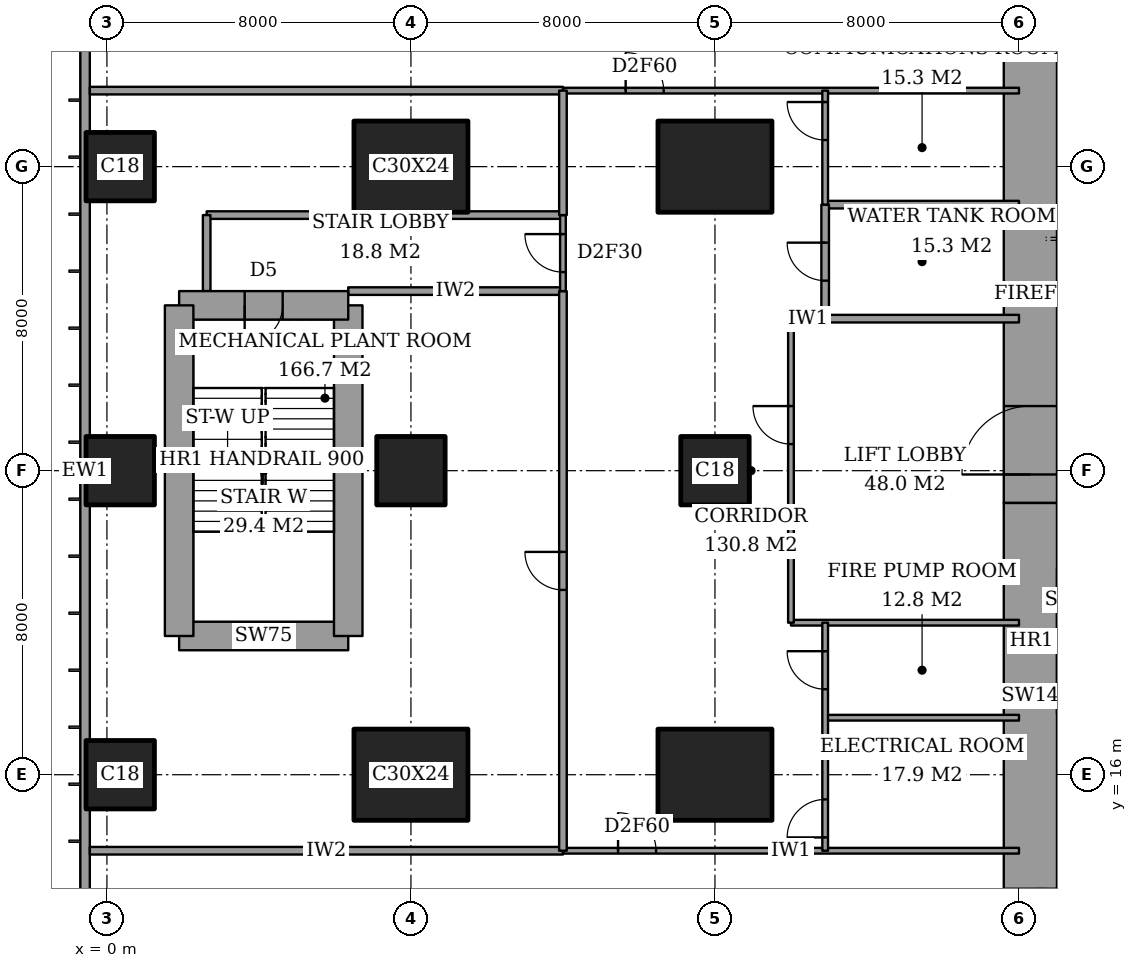
"""IFC4 building model, lengths in metres.
Left out: names, types, materials, properties, quantities, classifications, styles, units other than length and angle.
Written with IfcOpenShell. Run it as: python <this file> out.ifc"""

import sys

from ifc_helpers import new_model, si_unit, direction, frame, frame_2d, origin, origin_2d, place, context, subcontext, project, spatial, rectangle, extrude, element, fill, save


model = new_model("IFC4")
c1 = context("Model", 3, precision=1e-05, world=origin(), true_north=direction((0.0, 1.0)))
c2 = subcontext(c1, "Body", "Model", "MODEL_VIEW")
j1 = project(units=[si_unit("LENGTHUNIT", "METRE"), si_unit("PLANEANGLEUNIT", "RADIAN")], contexts=[c1])
p1 = place(None, origin())
s1 = spatial("IfcSite", under=j1, at=p1, CompositionType="ELEMENT")
p2 = place(p1, origin())
s2 = spatial("IfcBuilding", under=s1, at=p2, CompositionType="ELEMENT")
p3 = place(p2, frame((0.0, 0.0, 171.8)))
s3 = spatial("IfcBuildingStorey", under=s2, at=p3, CompositionType="ELEMENT", Elevation=171.8)
for number, where, z_axis, x_axis in (
    (1, (0.35, 16.0, 0.0), (0.0, 0.0, 1.0), (1.0, 0.0, 0.0)),
    (2, (0.35, 24.0, 0.0), (0.0, 0.0, 1.0), (1.0, 0.0, 0.0)),
    (3, (0.35, 32.0, 0.0), (0.0, 0.0, 1.0), (1.0, 0.0, 0.0)),
):
    element("IfcColumn", number, at=place(p3, frame(where, z_axis=z_axis, x_axis=x_axis)), inside=s3, PredefinedType="COLUMN", context=c2, shape_type="SweptSolid", body=[
        extrude(rectangle(XDim=1.8, YDim=1.8, at=origin_2d()), origin(), (0.0, 0.0, 1.0), 5.4),
    ])
p4 = place(p3, frame((8.0, 16.0, 0.0), z_axis=(0.0, 0.0, 1.0), x_axis=(1.0, 0.0, 0.0)))
e4 = element("IfcColumn", 4, at=p4, inside=s3, PredefinedType="COLUMN", context=c2, shape_type="SweptSolid", body=[
    extrude(rectangle(XDim=3.0, YDim=2.4, at=origin_2d()), origin(), (0.0, 0.0, 1.0), 5.4),
])
p5 = place(p3, frame((8.0, 24.0, 0.0), z_axis=(0.0, 0.0, 1.0), x_axis=(1.0, 0.0, 0.0)))
e5 = element("IfcColumn", 5, at=p5, inside=s3, PredefinedType="COLUMN", context=c2, shape_type="SweptSolid", body=[
    extrude(rectangle(XDim=1.8, YDim=1.8, at=origin_2d()), origin(), (0.0, 0.0, 1.0), 5.4),
])
for number, where, z_axis, x_axis in (
    (6, (8.0, 32.0, 0.0), (0.0, 0.0, 1.0), (1.0, 0.0, 0.0)),
    (7, (16.0, 16.0, 0.0), (0.0, 0.0, 1.0), (1.0, 0.0, 0.0)),
):
    element("IfcColumn", number, at=place(p3, frame(where, z_axis=z_axis, x_axis=x_axis)), inside=s3, PredefinedType="COLUMN", context=c2, shape_type="SweptSolid", body=[
        extrude(rectangle(XDim=3.0, YDim=2.4, at=origin_2d()), origin(), (0.0, 0.0, 1.0), 5.4),
    ])
p6 = place(p3, frame((16.0, 24.0, 0.0), z_axis=(0.0, 0.0, 1.0), x_axis=(1.0, 0.0, 0.0)))
e8 = element("IfcColumn", 8, at=p6, inside=s3, PredefinedType="COLUMN", context=c2, shape_type="SweptSolid", body=[
    extrude(rectangle(XDim=1.8, YDim=1.8, at=origin_2d()), origin(), (0.0, 0.0, 1.0), 5.4),
])
p7 = place(p3, frame((16.0, 32.0, 0.0), z_axis=(0.0, 0.0, 1.0), x_axis=(1.0, 0.0, 0.0)))
e9 = element("IfcColumn", 9, at=p7, inside=s3, PredefinedType="COLUMN", context=c2, shape_type="SweptSolid", body=[
    extrude(rectangle(XDim=3.0, YDim=2.4, at=origin_2d()), origin(), (0.0, 0.0, 1.0), 5.4),
])
p8 = place(p3, frame((24.3, 13.0, 0.0), z_axis=(0.0, 0.0, 1.0), x_axis=(0.0, 1.0, 0.0)))
e10 = element("IfcWall", 10, at=p8, inside=s3, PredefinedType="SHEAR", context=c2, shape_type="SweptSolid", body=[
    extrude(rectangle(XDim=10.15, YDim=1.4, at=frame_2d((5.075, 0.0))), origin(), (0.0, 0.0, 1.0), 5.4),
])
p9 = place(p3, frame((24.3, 23.15, 0.0), z_axis=(0.0, 0.0, 1.0), x_axis=(0.0, 1.0, 0.0)))
e11 = element("IfcWall", 11, at=p9, inside=s3, PredefinedType="SHEAR", context=c2, shape_type="SweptSolid", body=[
    extrude(rectangle(XDim=11.85, YDim=1.4, at=frame_2d((5.925, 0.0))), origin(), (0.0, 0.0, 1.0), 5.4),
])
p10 = place(p9, frame((0.75, 0.0, 0.0)))
e12 = element("IfcOpeningElement", 12, at=p10, cuts=e11, PredefinedType="OPENING", context=c2, shape_type="SweptSolid", body=[
    extrude(rectangle(XDim=1.8, YDim=2.4, at=frame_2d((0.9, 1.2))), frame((0.0, 0.71, 0.0), z_axis=(0.0, -1.0, 0.0), x_axis=(1.0, 0.0, 0.0)), (0.0, 0.0, 1.0), 1.42),
])
p11 = place(p3, frame((1.9, 19.65, 0.0), z_axis=(0.0, 0.0, 1.0), x_axis=(1.0, 0.0, 0.0)))
e13 = element("IfcWall", 13, at=p11, inside=s3, PredefinedType="SHEAR", context=c2, shape_type="SweptSolid", body=[
    extrude(rectangle(XDim=4.45, YDim=0.75, at=frame_2d((2.225, 0.0))), origin(), (0.0, 0.0, 1.0), 5.4),
])
p12 = place(p3, frame((6.35, 19.65, 0.0), z_axis=(0.0, 0.0, 1.0), x_axis=(0.0, 1.0, 0.0)))
e14 = element("IfcWall", 14, at=p12, inside=s3, PredefinedType="SHEAR", context=c2, shape_type="SweptSolid", body=[
    extrude(rectangle(XDim=8.7, YDim=0.75, at=frame_2d((4.35, 0.0))), origin(), (0.0, 0.0, 1.0), 5.4),
])
p13 = place(p3, frame((6.35, 28.35, 0.0), z_axis=(0.0, 0.0, 1.0), x_axis=(-1.0, 0.0, 0.0)))
e15 = element("IfcWall", 15, at=p13, inside=s3, PredefinedType="SHEAR", context=c2, shape_type="SweptSolid", body=[
    extrude(rectangle(XDim=4.45, YDim=0.75, at=frame_2d((2.225, 0.0))), origin(), (0.0, 0.0, 1.0), 5.4),
])
p14 = place(p13, frame((1.725, 0.0, 0.0)))
e16 = element("IfcOpeningElement", 16, at=p14, cuts=e15, PredefinedType="OPENING", context=c2, shape_type="SweptSolid", body=[
    extrude(rectangle(XDim=1.0, YDim=2.1, at=frame_2d((0.5, 1.05))), frame((0.0, 0.385, 0.0), z_axis=(0.0, -1.0, 0.0), x_axis=(1.0, 0.0, 0.0)), (0.0, 0.0, 1.0), 0.77),
])
p15 = place(p3, frame((1.9, 28.35, 0.0), z_axis=(0.0, 0.0, 1.0), x_axis=(0.0, -1.0, 0.0)))
e17 = element("IfcWall", 17, at=p15, inside=s3, PredefinedType="SHEAR", context=c2, shape_type="SweptSolid", body=[
    extrude(rectangle(XDim=8.7, YDim=0.75, at=frame_2d((4.35, 0.0))), origin(), (0.0, 0.0, 1.0), 5.4),
])
p16 = place(p3, frame((-0.575, 44.825, 0.0), z_axis=(0.0, 0.0, 1.0), x_axis=(0.0, -1.0, 0.0)))
e18 = element("IfcWall", 18, at=p16, inside=s3, PredefinedType="SOLIDWALL", context=c2, shape_type="SweptSolid", body=[
    extrude(rectangle(XDim=41.65, YDim=0.25, at=frame_2d((20.825, 0.0))), origin(), (0.0, 0.0, 1.0), 5.4),
])
p17 = place(p16, frame((0.825, 0.0, 0.9)))
e19 = element("IfcOpeningElement", 19, at=p17, cuts=e18, PredefinedType="OPENING", context=c2, shape_type="SweptSolid", body=[
    extrude(rectangle(XDim=2.4, YDim=2.4, at=frame_2d((1.2, 1.2))), frame((0.0, 0.135, 0.0), z_axis=(0.0, -1.0, 0.0), x_axis=(1.0, 0.0, 0.0)), (0.0, 0.0, 1.0), 0.27),
])
p18 = place(p16, frame((38.425, 0.0, 0.9)))
e20 = element("IfcOpeningElement", 20, at=p18, cuts=e18, PredefinedType="OPENING", context=c2, shape_type="SweptSolid", body=[
    extrude(rectangle(XDim=2.4, YDim=2.4, at=frame_2d((1.2, 1.2))), frame((0.0, 0.135, 0.0), z_axis=(0.0, -1.0, 0.0), x_axis=(1.0, 0.0, 0.0)), (0.0, 0.0, 1.0), 0.27),
])
p19 = place(p3, frame((-0.45, 14.0, 0.0), z_axis=(0.0, 0.0, 1.0), x_axis=(1.0, 0.0, 0.0)))
e21 = element("IfcWall", 21, at=p19, inside=s3, PredefinedType="PARTITIONING", context=c2, shape_type="SweptSolid", body=[
    extrude(rectangle(XDim=12.45, YDim=0.2, at=frame_2d((6.225, 0.0))), origin(), (0.0, 0.0, 1.0), 5.15),
])
p20 = place(p3, frame((12.0, 14.0, 0.0), z_axis=(0.0, 0.0, 1.0), x_axis=(1.0, 0.0, 0.0)))
e22 = element("IfcWall", 22, at=p20, inside=s3, PredefinedType="PARTITIONING", context=c2, shape_type="SweptSolid", body=[
    extrude(rectangle(XDim=12.0, YDim=0.15, at=frame_2d((6.0, 0.0))), origin(), (0.0, 0.0, 1.0), 5.15),
])
p21 = place(p20, frame((1.45, 0.0, 0.0)))
e23 = element("IfcOpeningElement", 23, at=p21, cuts=e22, PredefinedType="OPENING", context=c2, shape_type="SweptSolid", body=[
    extrude(rectangle(XDim=1.0, YDim=2.1, at=frame_2d((0.5, 1.05))), frame((0.0, 0.085, 0.0), z_axis=(0.0, -1.0, 0.0), x_axis=(1.0, 0.0, 0.0)), (0.0, 0.0, 1.0), 0.17),
])
p22 = place(p3, frame((18.9, 17.5, 0.0), z_axis=(0.0, 0.0, 1.0), x_axis=(1.0, 0.0, 0.0)))
e24 = element("IfcWall", 24, at=p22, inside=s3, PredefinedType="PARTITIONING", context=c2, shape_type="SweptSolid", body=[
    extrude(rectangle(XDim=5.1, YDim=0.15, at=frame_2d((2.55, 0.0))), origin(), (0.0, 0.0, 1.0), 5.15),
])
p23 = place(p3, frame((18.0, 20.0, 0.0), z_axis=(0.0, 0.0, 1.0), x_axis=(1.0, 0.0, 0.0)))
e25 = element("IfcWall", 25, at=p23, inside=s3, PredefinedType="PARTITIONING", context=c2, shape_type="SweptSolid", body=[
    extrude(rectangle(XDim=6.0, YDim=0.15, at=frame_2d((3.0, 0.0))), origin(), (0.0, 0.0, 1.0), 5.15),
])
p24 = place(p3, frame((18.9, 28.0, 0.0), z_axis=(0.0, 0.0, 1.0), x_axis=(1.0, 0.0, 0.0)))
e26 = element("IfcWall", 26, at=p24, inside=s3, PredefinedType="PARTITIONING", context=c2, shape_type="SweptSolid", body=[
    extrude(rectangle(XDim=5.1, YDim=0.2, at=frame_2d((2.55, 0.0))), origin(), (0.0, 0.0, 1.0), 5.15),
])
p25 = place(p3, frame((18.0, 28.0, 0.0), z_axis=(0.0, 0.0, 1.0), x_axis=(1.0, 0.0, 0.0)))
e27 = element("IfcWall", 27, at=p25, inside=s3, PredefinedType="PARTITIONING", context=c2, shape_type="SweptSolid", body=[
    extrude(rectangle(XDim=0.9, YDim=0.15, at=frame_2d((0.45, 0.0))), origin(), (0.0, 0.0, 1.0), 5.15),
])
p26 = place(p3, frame((6.35, 28.725, 0.0), z_axis=(0.0, 0.0, 1.0), x_axis=(1.0, 0.0, 0.0)))
e28 = element("IfcWall", 28, at=p26, inside=s3, PredefinedType="PARTITIONING", context=c2, shape_type="SweptSolid", body=[
    extrude(rectangle(XDim=5.65, YDim=0.2, at=frame_2d((2.825, 0.0))), origin(), (0.0, 0.0, 1.0), 5.15),
])
p27 = place(p3, frame((2.625, 30.725, 0.0), z_axis=(0.0, 0.0, 1.0), x_axis=(1.0, 0.0, 0.0)))
e29 = element("IfcWall", 29, at=p27, inside=s3, PredefinedType="PARTITIONING", context=c2, shape_type="SweptSolid", body=[
    extrude(rectangle(XDim=9.375, YDim=0.2, at=frame_2d((4.688, 0.0))), origin(), (0.0, 0.0, 1.0), 5.15),
])
p28 = place(p3, frame((18.9, 31.0, 0.0), z_axis=(0.0, 0.0, 1.0), x_axis=(1.0, 0.0, 0.0)))
e30 = element("IfcWall", 30, at=p28, inside=s3, PredefinedType="PARTITIONING", context=c2, shape_type="SweptSolid", body=[
    extrude(rectangle(XDim=5.1, YDim=0.2, at=frame_2d((2.55, 0.0))), origin(), (0.0, 0.0, 1.0), 5.15),
])
p29 = place(p3, frame((-0.45, 34.0, 0.0), z_axis=(0.0, 0.0, 1.0), x_axis=(1.0, 0.0, 0.0)))
e31 = element("IfcWall", 31, at=p29, inside=s3, PredefinedType="PARTITIONING", context=c2, shape_type="SweptSolid", body=[
    extrude(rectangle(XDim=12.45, YDim=0.2, at=frame_2d((6.225, 0.0))), origin(), (0.0, 0.0, 1.0), 5.15),
])
p30 = place(p3, frame((12.0, 34.0, 0.0), z_axis=(0.0, 0.0, 1.0), x_axis=(1.0, 0.0, 0.0)))
e32 = element("IfcWall", 32, at=p30, inside=s3, PredefinedType="PARTITIONING", context=c2, shape_type="SweptSolid", body=[
    extrude(rectangle(XDim=12.0, YDim=0.15, at=frame_2d((6.0, 0.0))), origin(), (0.0, 0.0, 1.0), 5.15),
])
p31 = place(p30, frame((1.65, 0.0, 0.0)))
e33 = element("IfcOpeningElement", 33, at=p31, cuts=e32, PredefinedType="OPENING", context=c2, shape_type="SweptSolid", body=[
    extrude(rectangle(XDim=1.0, YDim=2.1, at=frame_2d((0.5, 1.05))), frame((0.0, 0.085, 0.0), z_axis=(0.0, -1.0, 0.0), x_axis=(1.0, 0.0, 0.0)), (0.0, 0.0, 1.0), 0.17),
])
p32 = place(p3, frame((2.625, 28.725, 0.0), z_axis=(0.0, 0.0, 1.0), x_axis=(0.0, 1.0, 0.0)))
e34 = element("IfcWall", 34, at=p32, inside=s3, PredefinedType="PARTITIONING", context=c2, shape_type="SweptSolid", body=[
    extrude(rectangle(XDim=2.0, YDim=0.2, at=frame_2d((1.0, 0.0))), origin(), (0.0, 0.0, 1.0), 5.15),
])
p33 = place(p3, frame((12.0, 14.0, 0.0), z_axis=(0.0, 0.0, 1.0), x_axis=(0.0, 1.0, 0.0)))
e35 = element("IfcWall", 35, at=p33, inside=s3, PredefinedType="PARTITIONING", context=c2, shape_type="SweptSolid", body=[
    extrude(rectangle(XDim=14.725, YDim=0.2, at=frame_2d((7.363, 0.0))), origin(), (0.0, 0.0, 1.0), 5.15),
])
p34 = place(p33, frame((6.863, 0.0, 0.0)))
e36 = element("IfcOpeningElement", 36, at=p34, cuts=e35, PredefinedType="OPENING", context=c2, shape_type="SweptSolid", body=[
    extrude(rectangle(XDim=1.0, YDim=2.1, at=frame_2d((0.5, 1.05))), frame((0.0, 0.11, 0.0), z_axis=(0.0, -1.0, 0.0), x_axis=(1.0, 0.0, 0.0)), (0.0, 0.0, 1.0), 0.22),
])
p35 = place(p3, frame((12.0, 30.725, 0.0), z_axis=(0.0, 0.0, 1.0), x_axis=(0.0, 1.0, 0.0)))
e37 = element("IfcWall", 37, at=p35, inside=s3, PredefinedType="PARTITIONING", context=c2, shape_type="SweptSolid", body=[
    extrude(rectangle(XDim=3.275, YDim=0.2, at=frame_2d((1.637, 0.0))), origin(), (0.0, 0.0, 1.0), 5.15),
])
p36 = place(p3, frame((12.0, 28.725, 0.0), z_axis=(0.0, 0.0, 1.0), x_axis=(0.0, 1.0, 0.0)))
e38 = element("IfcWall", 38, at=p36, inside=s3, PredefinedType="PARTITIONING", context=c2, shape_type="SweptSolid", body=[
    extrude(rectangle(XDim=2.0, YDim=0.15, at=frame_2d((1.0, 0.0))), origin(), (0.0, 0.0, 1.0), 5.15),
])
p37 = place(p36, frame((0.5, 0.0, 0.0)))
e39 = element("IfcOpeningElement", 39, at=p37, cuts=e38, PredefinedType="OPENING", context=c2, shape_type="SweptSolid", body=[
    extrude(rectangle(XDim=1.0, YDim=2.1, at=frame_2d((0.5, 1.05))), frame((0.0, 0.085, 0.0), z_axis=(0.0, -1.0, 0.0), x_axis=(1.0, 0.0, 0.0)), (0.0, 0.0, 1.0), 0.17),
])
p38 = place(p3, frame((18.0, 20.0, 0.0), z_axis=(0.0, 0.0, 1.0), x_axis=(0.0, 1.0, 0.0)))
e40 = element("IfcWall", 40, at=p38, inside=s3, PredefinedType="PARTITIONING", context=c2, shape_type="SweptSolid", body=[
    extrude(rectangle(XDim=8.0, YDim=0.15, at=frame_2d((4.0, 0.0))), origin(), (0.0, 0.0, 1.0), 5.15),
])
p39 = place(p38, frame((4.7, 0.0, 0.0)))
e41 = element("IfcOpeningElement", 41, at=p39, cuts=e40, PredefinedType="OPENING", context=c2, shape_type="SweptSolid", body=[
    extrude(rectangle(XDim=1.0, YDim=2.1, at=frame_2d((0.5, 1.05))), frame((0.0, 0.085, 0.0), z_axis=(0.0, -1.0, 0.0), x_axis=(1.0, 0.0, 0.0)), (0.0, 0.0, 1.0), 0.17),
])
p40 = place(p3, frame((18.9, 28.0, 0.0), z_axis=(0.0, 0.0, 1.0), x_axis=(0.0, 1.0, 0.0)))
e42 = element("IfcWall", 42, at=p40, inside=s3, PredefinedType="PARTITIONING", context=c2, shape_type="SweptSolid", body=[
    extrude(rectangle(XDim=3.0, YDim=0.2, at=frame_2d((1.5, 0.0))), origin(), (0.0, 0.0, 1.0), 5.15),
])
p41 = place(p40, frame((1.0, 0.0, 0.0)))
e43 = element("IfcOpeningElement", 43, at=p41, cuts=e42, PredefinedType="OPENING", context=c2, shape_type="SweptSolid", body=[
    extrude(rectangle(XDim=1.0, YDim=2.1, at=frame_2d((0.5, 1.05))), frame((0.0, 0.11, 0.0), z_axis=(0.0, -1.0, 0.0), x_axis=(1.0, 0.0, 0.0)), (0.0, 0.0, 1.0), 0.22),
])
p42 = place(p3, frame((18.9, 14.0, 0.0), z_axis=(0.0, 0.0, 1.0), x_axis=(0.0, 1.0, 0.0)))
e44 = element("IfcWall", 44, at=p42, inside=s3, PredefinedType="PARTITIONING", context=c2, shape_type="SweptSolid", body=[
    extrude(rectangle(XDim=6.0, YDim=0.15, at=frame_2d((3.0, 0.0))), origin(), (0.0, 0.0, 1.0), 5.15),
])
p43 = place(p42, frame((0.35, 0.0, 0.0)))
e45 = element("IfcOpeningElement", 45, at=p43, cuts=e44, PredefinedType="OPENING", context=c2, shape_type="SweptSolid", body=[
    extrude(rectangle(XDim=1.0, YDim=2.1, at=frame_2d((0.5, 1.05))), frame((0.0, 0.085, 0.0), z_axis=(0.0, -1.0, 0.0), x_axis=(1.0, 0.0, 0.0)), (0.0, 0.0, 1.0), 0.17),
])
p44 = place(p42, frame((4.25, 0.0, 0.0)))
e46 = element("IfcOpeningElement", 46, at=p44, cuts=e44, PredefinedType="OPENING", context=c2, shape_type="SweptSolid", body=[
    extrude(rectangle(XDim=1.0, YDim=2.1, at=frame_2d((0.5, 1.05))), frame((0.0, 0.085, 0.0), z_axis=(0.0, -1.0, 0.0), x_axis=(1.0, 0.0, 0.0)), (0.0, 0.0, 1.0), 0.17),
])
p45 = place(p3, frame((18.9, 31.0, 0.0), z_axis=(0.0, 0.0, 1.0), x_axis=(0.0, 1.0, 0.0)))
e47 = element("IfcWall", 47, at=p45, inside=s3, PredefinedType="PARTITIONING", context=c2, shape_type="SweptSolid", body=[
    extrude(rectangle(XDim=3.0, YDim=0.15, at=frame_2d((1.5, 0.0))), origin(), (0.0, 0.0, 1.0), 5.15),
])
p46 = place(p45, frame((1.7, 0.0, 0.0)))
e48 = element("IfcOpeningElement", 48, at=p46, cuts=e47, PredefinedType="OPENING", context=c2, shape_type="SweptSolid", body=[
    extrude(rectangle(XDim=1.0, YDim=2.1, at=frame_2d((0.5, 1.05))), frame((0.0, 0.085, 0.0), z_axis=(0.0, -1.0, 0.0), x_axis=(1.0, 0.0, 0.0)), (0.0, 0.0, 1.0), 0.17),
])
p47 = place(p21, origin())
e49 = element("IfcDoor", 49, at=p47, inside=s3, OperationType="SINGLE_SWING_RIGHT", PredefinedType="DOOR", context=c2, shape_type="SweptSolid", body=[
    extrude(rectangle(XDim=1.0, YDim=2.1, at=frame_2d((0.5, 1.05))), frame((0.0, 0.025, 0.0), z_axis=(0.0, -1.0, 0.0), x_axis=(1.0, 0.0, 0.0)), (0.0, 0.0, 1.0), 0.05),
])
fill(e23, e49)
p48 = place(p34, origin())
e50 = element("IfcDoor", 50, at=p48, inside=s3, OperationType="SINGLE_SWING_LEFT", PredefinedType="DOOR", context=c2, shape_type="SweptSolid", body=[
    extrude(rectangle(XDim=1.0, YDim=2.1, at=frame_2d((0.5, 1.05))), frame((0.0, 0.025, 0.0), z_axis=(0.0, -1.0, 0.0), x_axis=(1.0, 0.0, 0.0)), (0.0, 0.0, 1.0), 0.05),
])
fill(e36, e50)
p49 = place(p31, origin())
e51 = element("IfcDoor", 51, at=p49, inside=s3, OperationType="SINGLE_SWING_RIGHT", PredefinedType="DOOR", context=c2, shape_type="SweptSolid", body=[
    extrude(rectangle(XDim=1.0, YDim=2.1, at=frame_2d((0.5, 1.05))), frame((0.0, 0.025, 0.0), z_axis=(0.0, -1.0, 0.0), x_axis=(1.0, 0.0, 0.0)), (0.0, 0.0, 1.0), 0.05),
])
fill(e33, e51)
p50 = place(p39, origin())
e52 = element("IfcDoor", 52, at=p50, inside=s3, OperationType="SINGLE_SWING_LEFT", PredefinedType="DOOR", context=c2, shape_type="SweptSolid", body=[
    extrude(rectangle(XDim=1.0, YDim=2.1, at=frame_2d((0.5, 1.05))), frame((0.0, 0.025, 0.0), z_axis=(0.0, -1.0, 0.0), x_axis=(1.0, 0.0, 0.0)), (0.0, 0.0, 1.0), 0.05),
])
fill(e41, e52)
p51 = place(p43, origin())
e53 = element("IfcDoor", 53, at=p51, inside=s3, OperationType="SINGLE_SWING_RIGHT", PredefinedType="DOOR", context=c2, shape_type="SweptSolid", body=[
    extrude(rectangle(XDim=1.0, YDim=2.1, at=frame_2d((0.5, 1.05))), frame((0.0, 0.025, 0.0), z_axis=(0.0, -1.0, 0.0), x_axis=(1.0, 0.0, 0.0)), (0.0, 0.0, 1.0), 0.05),
])
fill(e45, e53)
p52 = place(p44, origin())
e54 = element("IfcDoor", 54, at=p52, inside=s3, OperationType="SINGLE_SWING_LEFT", PredefinedType="DOOR", context=c2, shape_type="SweptSolid", body=[
    extrude(rectangle(XDim=1.0, YDim=2.1, at=frame_2d((0.5, 1.05))), frame((0.0, 0.025, 0.0), z_axis=(0.0, -1.0, 0.0), x_axis=(1.0, 0.0, 0.0)), (0.0, 0.0, 1.0), 0.05),
])
fill(e46, e54)
p53 = place(p41, origin())
e55 = element("IfcDoor", 55, at=p53, inside=s3, OperationType="SINGLE_SWING_LEFT", PredefinedType="DOOR", context=c2, shape_type="SweptSolid", body=[
    extrude(rectangle(XDim=1.0, YDim=2.1, at=frame_2d((0.5, 1.05))), frame((0.0, 0.025, 0.0), z_axis=(0.0, -1.0, 0.0), x_axis=(1.0, 0.0, 0.0)), (0.0, 0.0, 1.0), 0.05),
])
fill(e43, e55)
p54 = place(p46, origin())
e56 = element("IfcDoor", 56, at=p54, inside=s3, OperationType="SINGLE_SWING_LEFT", PredefinedType="DOOR", context=c2, shape_type="SweptSolid", body=[
    extrude(rectangle(XDim=1.0, YDim=2.1, at=frame_2d((0.5, 1.05))), frame((0.0, 0.025, 0.0), z_axis=(0.0, -1.0, 0.0), x_axis=(1.0, 0.0, 0.0)), (0.0, 0.0, 1.0), 0.05),
])
fill(e48, e56)
p55 = place(p37, origin())
e57 = element("IfcDoor", 57, at=p55, inside=s3, OperationType="SINGLE_SWING_LEFT", PredefinedType="DOOR", context=c2, shape_type="SweptSolid", body=[
    extrude(rectangle(XDim=1.0, YDim=2.1, at=frame_2d((0.5, 1.05))), frame((0.0, 0.025, 0.0), z_axis=(0.0, -1.0, 0.0), x_axis=(1.0, 0.0, 0.0)), (0.0, 0.0, 1.0), 0.05),
])
fill(e39, e57)
p56 = place(p10, origin())
e58 = element("IfcDoor", 58, at=p56, inside=s3, OperationType="DOUBLE_DOOR_DOUBLE_SWING", PredefinedType="DOOR", context=c2, shape_type="SweptSolid", body=[
    extrude(rectangle(XDim=1.8, YDim=2.4, at=frame_2d((0.9, 1.2))), frame((0.0, 0.025, 0.0), z_axis=(0.0, -1.0, 0.0), x_axis=(1.0, 0.0, 0.0)), (0.0, 0.0, 1.0), 0.05),
])
fill(e12, e58)
p57 = place(p14, origin())
e59 = element("IfcDoor", 59, at=p57, inside=s3, OperationType="SINGLE_SWING_LEFT", PredefinedType="DOOR", context=c2, shape_type="SweptSolid", body=[
    extrude(rectangle(XDim=1.0, YDim=2.1, at=frame_2d((0.5, 1.05))), frame((0.0, 0.025, 0.0), z_axis=(0.0, -1.0, 0.0), x_axis=(1.0, 0.0, 0.0)), (0.0, 0.0, 1.0), 0.05),
])
fill(e16, e59)
save(model, sys.argv[1])
